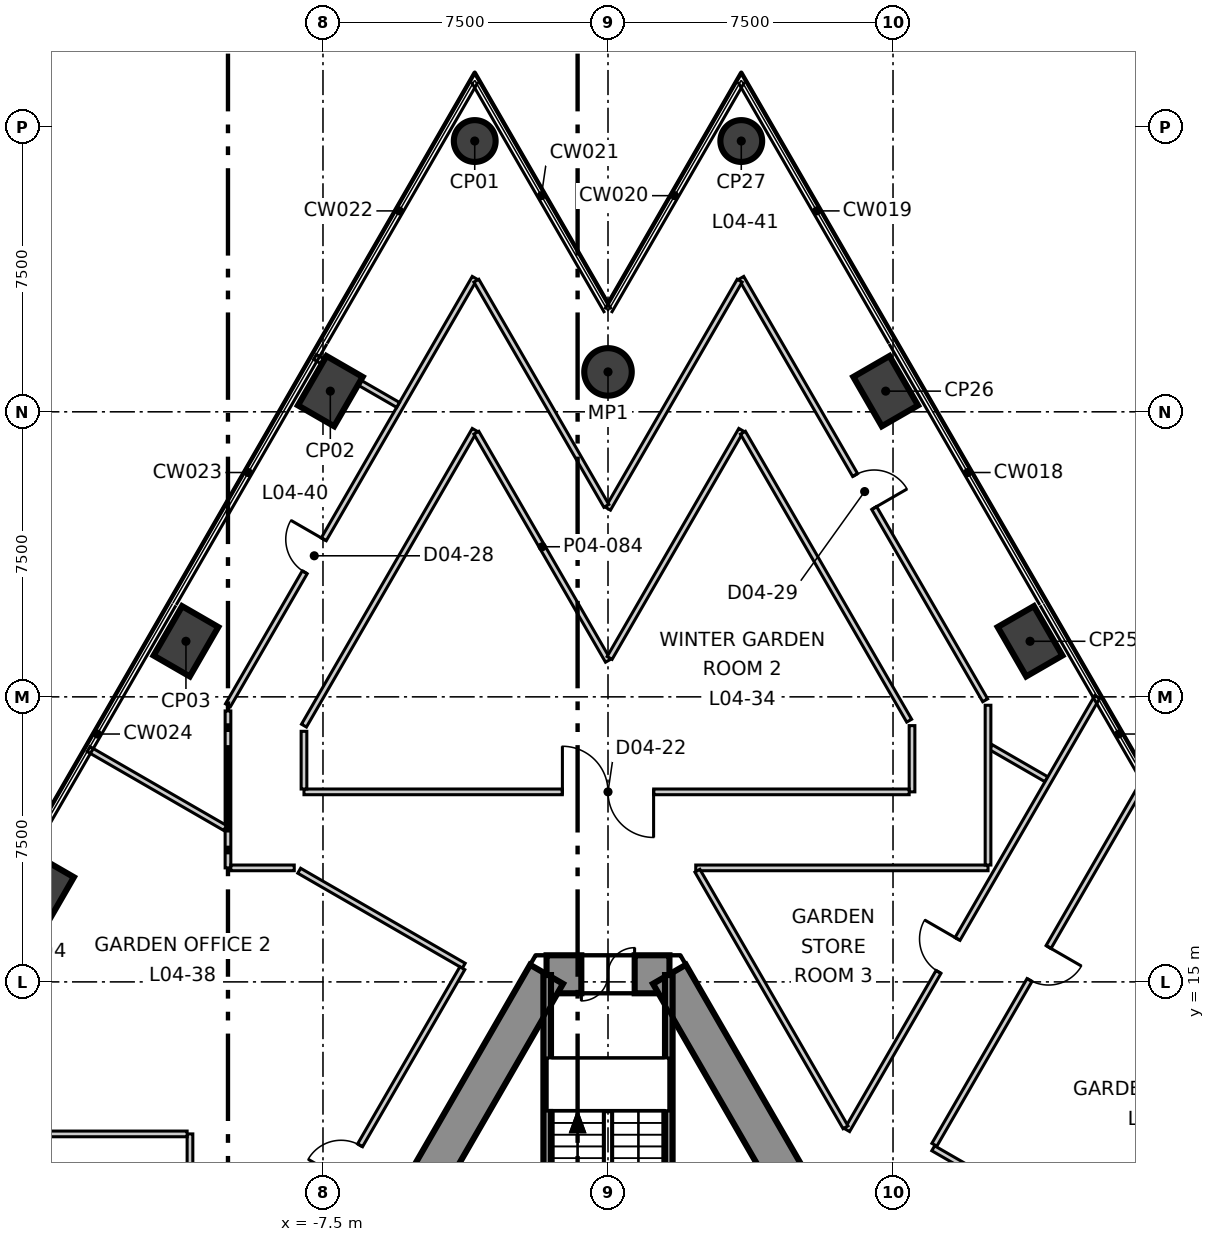
"""IFC4 building model, lengths in metres.
Left out: names, types, materials, properties, quantities, classifications, styles, units other than length and angle.
Written with IfcOpenShell. Run it as: python <this file> out.ifc"""

import sys

from ifc_helpers import new_model, si_unit, direction, frame, frame_2d, origin, origin_2d, place, context, subcontext, project, spatial, polyline, rectangle, circle, outline, extrude, element, fill, save


model = new_model("IFC4")
c1 = context("Model", 3, precision=1e-05, world=origin(), true_north=direction((0.0, 1.0)))
c2 = subcontext(c1, "Body", "Model", "MODEL_VIEW")
j1 = project(units=[si_unit("LENGTHUNIT", "METRE"), si_unit("PLANEANGLEUNIT", "RADIAN")], contexts=[c1])
p1 = place(None, origin())
s1 = spatial("IfcSite", under=j1, at=p1, CompositionType="ELEMENT")
p2 = place(p1, origin())
s2 = spatial("IfcBuilding", under=s1, at=p2, CompositionType="ELEMENT")
p3 = place(p2, frame((0.0, 0.0, 25.3)))
s3 = spatial("IfcBuildingStorey", under=s2, at=p3, CompositionType="ELEMENT", Elevation=25.3)
p4 = place(p3, frame((1.617, 15.2, -0.4), z_axis=(0.0, 0.0, 1.0), x_axis=(-1.0, 0.0, 0.0)))
e1 = element("IfcWall", 1, at=p4, inside=s3, PredefinedType="SHEAR", context=c2, shape_type="SweptSolid", body=[
    extrude(outline(polyline([(-0.288, -0.5), (1.617, -0.5), (3.522, -0.5), (2.945, 0.5), (1.617, 0.5), (0.289, 0.5), (-0.288, -0.5)])), origin(), (0.0, 0.0, 1.0), 5.0),
])
p5 = place(p4, frame((0.917, 0.0, 0.4)))
e2 = element("IfcOpeningElement", 2, at=p5, cuts=e1, PredefinedType="OPENING", context=c2, shape_type="SweptSolid", body=[
    extrude(rectangle(XDim=1.4, YDim=2.1, at=frame_2d((0.7, 1.05))), frame((0.0, 0.51, 0.0), z_axis=(0.0, -1.0, 0.0), x_axis=(1.0, 0.0, 0.0)), (0.0, 0.0, 1.0), 1.02),
])
p6 = place(p3, frame((-1.617, 15.2, -0.4), z_axis=(0.0, 0.0, 1.0), x_axis=(-0.499992141631, -0.866029940768, 0.0)))
e3 = element("IfcWall", 3, at=p6, inside=s3, PredefinedType="SHEAR", context=c2, shape_type="SweptSolid", body=[
    extrude(outline(polyline([(-0.289, -0.499), (1.656, -0.499), (3.601, -0.499), (5.547, -0.499), (7.492, -0.499), (9.437, -0.5), (11.382, -0.5), (13.328, -0.5), (15.273, -0.5), (17.218, -0.5), (19.163, -0.5), (21.109, -0.5), (23.054, -0.5), (24.999, -0.5), (24.422, 0.5), (22.566, 0.5), (20.709, 0.5), (18.853, 0.5), (16.997, 0.5), (15.14, 0.5), (13.284, 0.5), (11.427, 0.5), (9.571, 0.5), (7.715, 0.5), (5.858, 0.5), (4.002, 0.5), (2.146, 0.5), (0.289, 0.5), (-0.289, -0.499)])), origin(), (0.0, 0.0, 1.0), 5.0),
])
p7 = place(p6, frame((11.805, 0.0, 0.4)))
e4 = element("IfcOpeningElement", 4, at=p7, cuts=e3, PredefinedType="OPENING", context=c2, shape_type="SweptSolid", body=[
    extrude(rectangle(XDim=1.1, YDim=2.1, at=frame_2d((0.55, 1.05))), frame((0.0, 0.51, 0.0), z_axis=(0.0, -1.0, 0.0), x_axis=(1.0, 0.0, 0.0)), (0.0, 0.0, 1.0), 1.02),
])
p8 = place(p3, frame((13.972, -6.2, -0.4), z_axis=(0.0, 0.0, 1.0), x_axis=(-0.499992141631, 0.866029940768, 0.0)))
e5 = element("IfcWall", 5, at=p8, inside=s3, PredefinedType="SHEAR", context=c2, shape_type="SweptSolid", body=[
    extrude(outline(polyline([(-0.288, -0.5), (1.657, -0.5), (3.602, -0.5), (5.547, -0.5), (7.493, -0.5), (9.438, -0.5), (11.383, -0.5), (13.328, -0.5), (15.273, -0.5), (17.218, -0.499), (19.164, -0.499), (21.109, -0.499), (23.054, -0.499), (24.999, -0.499), (24.422, 0.5), (22.566, 0.5), (20.709, 0.5), (18.853, 0.5), (16.996, 0.5), (15.14, 0.5), (13.283, 0.5), (11.427, 0.5), (9.57, 0.5), (7.714, 0.5), (5.857, 0.5), (4.001, 0.5), (2.145, 0.5), (0.288, 0.5), (-0.288, -0.5)])), origin(), (0.0, 0.0, 1.0), 5.0),
])
p9 = place(p8, frame((11.455, 0.0, 0.4)))
e6 = element("IfcOpeningElement", 6, at=p9, cuts=e5, PredefinedType="OPENING", context=c2, shape_type="SweptSolid", body=[
    extrude(rectangle(XDim=1.8, YDim=2.1, at=frame_2d((0.9, 1.05))), frame((0.0, 0.51, 0.0), z_axis=(0.0, -1.0, 0.0), x_axis=(1.0, 0.0, 0.0)), (0.0, 0.0, 1.0), 1.02),
])
p10 = place(p3, frame((-3.507, 37.125, -0.4), z_axis=(0.0, 0.0, 1.0), x_axis=(0.5, 0.866025403784, 0.0)))
e7 = element("IfcColumn", 7, at=p10, inside=s3, PredefinedType="COLUMN", context=c2, shape_type="SweptSolid", body=[
    extrude(circle(Radius=0.55, at=origin_2d()), origin(), (0.0, 0.0, 1.0), 5.0),
])
for number, where, z_axis, x_axis in (
    (8, (-7.307, 30.544, -0.4), (0.0, 0.0, 1.0), (0.5, 0.866, 0.0)),
    (9, (-11.106, 23.962, -0.4), (0.0, 0.0, 1.0), (0.5, 0.866, 0.0)),
    (10, (-14.906, 17.381, -0.4), (0.0, 0.0, 1.0), (0.5, 0.866, 0.0)),
    (11, (11.106, 23.962, -0.4), (0.0, 0.0, 1.0), (-0.5, 0.866, 0.0)),
    (12, (7.307, 30.544, -0.4), (0.0, 0.0, 1.0), (-0.5, 0.866, 0.0)),
):
    element("IfcColumn", number, at=place(p3, frame(where, z_axis=z_axis, x_axis=x_axis)), inside=s3, PredefinedType="COLUMN", context=c2, shape_type="SweptSolid", body=[
        extrude(rectangle(XDim=1.5, YDim=1.1, at=origin_2d()), origin(), (0.0, 0.0, 1.0), 5.0),
    ])
p11 = place(p3, frame((3.507, 37.125, -0.4), z_axis=(0.0, 0.0, 1.0), x_axis=(-0.5, 0.866025403784, 0.0)))
e13 = element("IfcColumn", 13, at=p11, inside=s3, PredefinedType="COLUMN", context=c2, shape_type="SweptSolid", body=[
    extrude(circle(Radius=0.55, at=origin_2d()), origin(), (0.0, 0.0, 1.0), 5.0),
])
p12 = place(p3, frame((0.0, 31.05, -0.4), z_axis=(0.0, 0.0, 1.0), x_axis=(1.0, 0.0, 0.0)))
e14 = element("IfcColumn", 14, at=p12, inside=s3, PredefinedType="COLUMN", context=c2, shape_type="SweptSolid", body=[
    extrude(circle(Radius=0.625, at=origin_2d()), origin(), (0.0, 0.0, 1.0), 5.0),
])
p13 = place(p3, frame((-10.0, 22.279, 0.0), z_axis=(0.0, 0.0, 1.0), x_axis=(0.50000725545, 0.866021214808, 0.0)))
e15 = element("IfcWall", 15, at=p13, inside=s3, PredefinedType="PARTITIONING", context=c2, shape_type="SweptSolid", body=[
    extrude(rectangle(XDim=12.986, YDim=0.15, at=frame_2d((6.493, 0.0))), origin(), (0.0, 0.0, 1.0), 4.6),
])
p14 = place(p13, frame((4.041, 0.0, 0.0)))
e16 = element("IfcOpeningElement", 16, at=p14, cuts=e15, PredefinedType="OPENING", context=c2, shape_type="SweptSolid", body=[
    extrude(rectangle(XDim=1.0, YDim=2.1, at=frame_2d((0.5, 1.05))), frame((0.0, 0.085, 0.0), z_axis=(0.0, -1.0, 0.0), x_axis=(1.0, 0.0, 0.0)), (0.0, 0.0, 1.0), 0.17),
])
p15 = place(p3, frame((-10.0, 18.0, 0.0), z_axis=(0.0, 0.0, 1.0), x_axis=(0.0, 1.0, 0.0)))
e17 = element("IfcWall", 17, at=p15, inside=s3, PredefinedType="PARTITIONING", context=c2, shape_type="SweptSolid", body=[
    extrude(rectangle(XDim=4.129, YDim=0.15, at=frame_2d((2.064, 0.0))), origin(), (0.0, 0.0, 1.0), 4.6),
])
p16 = place(p3, frame((-9.925, 18.0, 0.0), z_axis=(0.0, 0.0, 1.0), x_axis=(1.0, 0.0, 0.0)))
e18 = element("IfcWall", 18, at=p16, inside=s3, PredefinedType="PARTITIONING", context=c2, shape_type="SweptSolid", body=[
    extrude(rectangle(XDim=1.669, YDim=0.15, at=frame_2d((0.834, 0.0))), origin(), (0.0, 0.0, 1.0), 4.6),
])
p17 = place(p3, frame((2.309, 18.0, 0.0), z_axis=(0.0, 0.0, 1.0), x_axis=(1.0, 0.0, 0.0)))
e19 = element("IfcWall", 19, at=p17, inside=s3, PredefinedType="PARTITIONING", context=c2, shape_type="SweptSolid", body=[
    extrude(rectangle(XDim=7.691, YDim=0.15, at=frame_2d((3.845, 0.0))), origin(), (0.0, 0.0, 1.0), 4.6),
])
p18 = place(p3, frame((-13.668, 21.125, 0.0), z_axis=(0.0, 0.0, 1.0), x_axis=(0.865970972971, -0.500094265086, 0.0)))
e20 = element("IfcWall", 20, at=p18, inside=s3, PredefinedType="PARTITIONING", context=c2, shape_type="SweptSolid", body=[
    extrude(rectangle(XDim=4.149, YDim=0.15, at=frame_2d((2.075, 0.0))), origin(), (0.0, 0.0, 1.0), 4.6),
])
p19 = place(p3, frame((-8.126, 17.925, 0.0), z_axis=(0.0, 0.0, 1.0), x_axis=(0.866022959057, -0.500004234368, 0.0)))
e21 = element("IfcWall", 21, at=p19, inside=s3, PredefinedType="PARTITIONING", context=c2, shape_type="SweptSolid", body=[
    extrude(rectangle(XDim=5.0, YDim=0.15, at=frame_2d((2.5, 0.0))), origin(), (0.0, 0.0, 1.0), 4.6),
])
p20 = place(p3, frame((-9.716, 5.172, 0.0), z_axis=(0.0, 0.0, 1.0), x_axis=(0.500064951837, 0.865987900576, 0.0)))
e22 = element("IfcWall", 22, at=p20, inside=s3, PredefinedType="PARTITIONING", context=c2, shape_type="SweptSolid", body=[
    extrude(rectangle(XDim=11.765, YDim=0.15, at=frame_2d((5.882, 0.0))), origin(), (0.0, 0.0, 1.0), 4.6),
])
p21 = place(p20, frame((5.382, 0.0, 0.0)))
e23 = element("IfcOpeningElement", 23, at=p21, cuts=e22, PredefinedType="OPENING", context=c2, shape_type="SweptSolid", body=[
    extrude(rectangle(XDim=1.0, YDim=2.1, at=frame_2d((0.5, 1.05))), frame((0.0, 0.085, 0.0), z_axis=(0.0, -1.0, 0.0), x_axis=(1.0, 0.0, 0.0)), (0.0, 0.0, 1.0), 0.17),
])
p22 = place(p3, frame((-11.0, 5.913, 0.0), z_axis=(0.0, 0.0, 1.0), x_axis=(0.0, 1.0, 0.0)))
e24 = element("IfcWall", 24, at=p22, inside=s3, PredefinedType="PARTITIONING", context=c2, shape_type="SweptSolid", body=[
    extrude(rectangle(XDim=5.087, YDim=0.15, at=frame_2d((2.543, 0.0))), origin(), (0.0, 0.0, 1.0), 4.6),
])
p23 = place(p3, frame((-16.426, 11.0, 0.0), z_axis=(0.0, 0.0, 1.0), x_axis=(1.0, 0.0, 0.0)))
e25 = element("IfcWall", 25, at=p23, inside=s3, PredefinedType="PARTITIONING", context=c2, shape_type="SweptSolid", body=[
    extrude(rectangle(XDim=5.351, YDim=0.15, at=frame_2d((2.676, 0.0))), origin(), (0.0, 0.0, 1.0), 4.6),
])
p24 = place(p3, frame((-7.711, 31.444, 0.0), z_axis=(0.0, 0.0, 1.0), x_axis=(0.86593764446, -0.500151972811, 0.0)))
e26 = element("IfcWall", 26, at=p24, inside=s3, PredefinedType="PARTITIONING", context=c2, shape_type="SweptSolid", body=[
    extrude(rectangle(XDim=2.526, YDim=0.15, at=frame_2d((1.263, 0.0))), origin(), (0.0, 0.0, 1.0), 4.6),
])
p25 = place(p3, frame((10.075, 21.175, 0.0), z_axis=(0.0, 0.0, 1.0), x_axis=(0.866072411327, -0.499918571708, 0.0)))
e27 = element("IfcWall", 27, at=p25, inside=s3, PredefinedType="PARTITIONING", context=c2, shape_type="SweptSolid", body=[
    extrude(rectangle(XDim=1.688, YDim=0.15, at=frame_2d((0.844, 0.0))), origin(), (0.0, 0.0, 1.0), 4.6),
])
p26 = place(p3, frame((10.0, 18.075, 0.0), z_axis=(0.0, 0.0, 1.0), x_axis=(0.0, 1.0, 0.0)))
e28 = element("IfcWall", 28, at=p26, inside=s3, PredefinedType="PARTITIONING", context=c2, shape_type="SweptSolid", body=[
    extrude(rectangle(XDim=4.204, YDim=0.15, at=frame_2d((2.102, 0.0))), origin(), (0.0, 0.0, 1.0), 4.6),
])
p27 = place(p3, frame((3.507, 33.525, 0.0), z_axis=(0.0, 0.0, 1.0), x_axis=(0.500009484899, -0.866019927606, 0.0)))
e29 = element("IfcWall", 29, at=p27, inside=s3, PredefinedType="PARTITIONING", context=c2, shape_type="SweptSolid", body=[
    extrude(rectangle(XDim=12.836, YDim=0.15, at=frame_2d((6.418, 0.0))), origin(), (0.0, 0.0, 1.0), 4.6),
])
p28 = place(p27, frame((5.993, 0.0, 0.0)))
e30 = element("IfcOpeningElement", 30, at=p28, cuts=e29, PredefinedType="OPENING", context=c2, shape_type="SweptSolid", body=[
    extrude(rectangle(XDim=1.0, YDim=2.1, at=frame_2d((0.5, 1.05))), frame((0.0, 0.085, 0.0), z_axis=(0.0, -1.0, 0.0), x_axis=(1.0, 0.0, 0.0)), (0.0, 0.0, 1.0), 0.17),
])
p29 = place(p3, frame((0.0, 27.45, 0.0), z_axis=(0.0, 0.0, 1.0), x_axis=(0.500001051461, 0.866024796723, 0.0)))
e31 = element("IfcWall", 31, at=p29, inside=s3, PredefinedType="PARTITIONING", context=c2, shape_type="SweptSolid", body=[
    extrude(rectangle(XDim=6.928, YDim=0.15, at=frame_2d((3.464, 0.0))), origin(), (0.0, 0.0, 1.0), 4.6),
])
p30 = place(p3, frame((-3.464, 33.45, 0.0), z_axis=(0.0, 0.0, 1.0), x_axis=(0.500034424931, -0.866005527629, 0.0)))
e32 = element("IfcWall", 32, at=p30, inside=s3, PredefinedType="PARTITIONING", context=c2, shape_type="SweptSolid", body=[
    extrude(rectangle(XDim=6.842, YDim=0.15, at=frame_2d((3.421, 0.0))), origin(), (0.0, 0.0, 1.0), 4.6),
])
p31 = place(p3, frame((6.293, 11.099, 0.0), z_axis=(0.0, 0.0, 1.0), x_axis=(0.500016782699, 0.866015714072, 0.0)))
e33 = element("IfcWall", 33, at=p31, inside=s3, PredefinedType="PARTITIONING", context=c2, shape_type="SweptSolid", body=[
    extrude(rectangle(XDim=13.164, YDim=0.15, at=frame_2d((6.582, 0.0))), origin(), (0.0, 0.0, 1.0), 4.6),
])
p32 = place(p31, frame((4.809, 0.0, 0.0)))
e34 = element("IfcOpeningElement", 34, at=p32, cuts=e33, PredefinedType="OPENING", context=c2, shape_type="SweptSolid", body=[
    extrude(rectangle(XDim=1.0, YDim=2.1, at=frame_2d((0.5, 1.05))), frame((0.0, 0.085, 0.0), z_axis=(0.0, -1.0, 0.0), x_axis=(1.0, 0.0, 0.0)), (0.0, 0.0, 1.0), 0.17),
])
p33 = place(p3, frame((2.353, 17.925, 0.0), z_axis=(0.0, 0.0, 1.0), x_axis=(0.499932120426, -0.866064590528, 0.0)))
e35 = element("IfcWall", 35, at=p33, inside=s3, PredefinedType="PARTITIONING", context=c2, shape_type="SweptSolid", body=[
    extrude(rectangle(XDim=7.795, YDim=0.15, at=frame_2d((3.897, 0.0))), origin(), (0.0, 0.0, 1.0), 4.6),
])
p34 = place(p3, frame((8.558, 10.622, 0.0), z_axis=(0.0, 0.0, 1.0), x_axis=(0.866055559963, -0.499947764329, 0.0)))
e36 = element("IfcWall", 36, at=p34, inside=s3, PredefinedType="PARTITIONING", context=c2, shape_type="SweptSolid", body=[
    extrude(rectangle(XDim=7.129, YDim=0.15, at=frame_2d((3.564, 0.0))), origin(), (0.0, 0.0, 1.0), 4.6),
])
p35 = place(p3, frame((8.588, 10.714, 0.0), z_axis=(0.0, 0.0, 1.0), x_axis=(0.500047639521, 0.865997897347, 0.0)))
e37 = element("IfcWall", 37, at=p35, inside=s3, PredefinedType="PARTITIONING", context=c2, shape_type="SweptSolid", body=[
    extrude(rectangle(XDim=11.091, YDim=0.15, at=frame_2d((5.546, 0.0))), origin(), (0.0, 0.0, 1.0), 4.05),
])
p36 = place(p35, frame((5.008, 0.0, 0.0)))
e38 = element("IfcOpeningElement", 38, at=p36, cuts=e37, PredefinedType="OPENING", context=c2, shape_type="SweptSolid", body=[
    extrude(rectangle(XDim=1.0, YDim=2.1, at=frame_2d((0.5, 1.05))), frame((0.0, 0.085, 0.0), z_axis=(0.0, -1.0, 0.0), x_axis=(1.0, 0.0, 0.0)), (0.0, 0.0, 1.0), 0.17),
])
p37 = place(p3, frame((-8.0, 21.743, 0.0), z_axis=(0.0, 0.0, 1.0), x_axis=(0.499999188372, 0.866025872377, 0.0)))
e39 = element("IfcWall", 39, at=p37, inside=s3, PredefinedType="PARTITIONING", context=c2, shape_type="SweptSolid", body=[
    extrude(rectangle(XDim=8.986, YDim=0.15, at=frame_2d((4.493, 0.0))), origin(), (0.0, 0.0, 1.0), 4.6),
])
p38 = place(p3, frame((8.0, 20.0, 0.0), z_axis=(0.0, 0.0, 1.0), x_axis=(0.0, 1.0, 0.0)))
e40 = element("IfcWall", 40, at=p38, inside=s3, PredefinedType="PARTITIONING", context=c2, shape_type="SweptSolid", body=[
    extrude(rectangle(XDim=1.743, YDim=0.15, at=frame_2d((0.872, 0.0))), origin(), (0.0, 0.0, 1.0), 4.6),
])
p39 = place(p3, frame((-8.0, 20.0, 0.0), z_axis=(0.0, 0.0, 1.0), x_axis=(1.0, 0.0, 0.0)))
e41 = element("IfcWall", 41, at=p39, inside=s3, PredefinedType="PARTITIONING", context=c2, shape_type="SweptSolid", body=[
    extrude(rectangle(XDim=15.925, YDim=0.15, at=frame_2d((7.962, 0.0))), origin(), (0.0, 0.0, 1.0), 4.6),
])
p40 = place(p39, frame((6.8, 0.0, 0.0)))
e42 = element("IfcOpeningElement", 42, at=p40, cuts=e41, PredefinedType="OPENING", context=c2, shape_type="SweptSolid", body=[
    extrude(rectangle(XDim=2.4, YDim=2.1, at=frame_2d((1.2, 1.05))), frame((0.0, 0.085, 0.0), z_axis=(0.0, -1.0, 0.0), x_axis=(1.0, 0.0, 0.0)), (0.0, 0.0, 1.0), 0.17),
])
p41 = place(p3, frame((-8.0, 20.075, 0.0), z_axis=(0.0, 0.0, 1.0), x_axis=(0.0, 1.0, 0.0)))
e43 = element("IfcWall", 43, at=p41, inside=s3, PredefinedType="PARTITIONING", context=c2, shape_type="SweptSolid", body=[
    extrude(rectangle(XDim=1.518, YDim=0.15, at=frame_2d((0.759, 0.0))), origin(), (0.0, 0.0, 1.0), 4.6),
])
for number, where, z_axis, x_axis in (
    (44, (-3.464, 29.45, 0.0), (0.0, 0.0, 1.0), (0.5, -0.866, 0.0)),
    (45, (0.043, 23.524, 0.0), (0.0, 0.0, 1.0), (0.5, 0.866, 0.0)),
):
    element("IfcWall", number, at=place(p3, frame(where, z_axis=z_axis, x_axis=x_axis)), inside=s3, PredefinedType="PARTITIONING", context=c2, shape_type="SweptSolid", body=[
        extrude(rectangle(XDim=6.929, YDim=0.15, at=frame_2d((3.464, 0.0))), origin(), (0.0, 0.0, 1.0), 4.6),
    ])
p42 = place(p3, frame((3.551, 29.45, 0.0), z_axis=(0.0, 0.0, 1.0), x_axis=(0.499956767928, -0.866050362394, 0.0)))
e46 = element("IfcWall", 46, at=p42, inside=s3, PredefinedType="PARTITIONING", context=c2, shape_type="SweptSolid", body=[
    extrude(rectangle(XDim=8.749, YDim=0.15, at=frame_2d((4.375, 0.0))), origin(), (0.0, 0.0, 1.0), 4.6),
])
for number, where, z_axis, x_axis in (
    (47, (1.6, 6.615, 0.0), (0.0, 0.0, 1.0), (0.0, 1.0, 0.0)),
    (48, (-1.6, 6.615, 0.0), (0.0, 0.0, 1.0), (0.0, 1.0, 0.0)),
):
    element("IfcWall", number, at=place(p3, frame(where, z_axis=z_axis, x_axis=x_axis)), inside=s3, PredefinedType="SOLIDWALL", context=c2, shape_type="SweptSolid", body=[
        extrude(rectangle(XDim=8.565, YDim=0.2, at=frame_2d((4.282, 0.0))), origin(), (0.0, 0.0, 1.0), 4.6),
    ])
p43 = place(p40, origin())
e49 = element("IfcDoor", 49, at=p43, inside=s3, OperationType="DOUBLE_DOOR_SINGLE_SWING", PredefinedType="DOOR", context=c2, shape_type="SweptSolid", body=[
    extrude(rectangle(XDim=2.4, YDim=2.1, at=frame_2d((1.2, 1.05))), frame((0.0, 0.025, 0.0), z_axis=(0.0, -1.0, 0.0), x_axis=(1.0, 0.0, 0.0)), (0.0, 0.0, 1.0), 0.05),
])
fill(e42, e49)
p44 = place(p21, origin())
e50 = element("IfcDoor", 50, at=p44, inside=s3, OperationType="SINGLE_SWING_RIGHT", PredefinedType="DOOR", context=c2, shape_type="SweptSolid", body=[
    extrude(rectangle(XDim=1.0, YDim=2.1, at=frame_2d((0.5, 1.05))), frame((0.0, 0.025, 0.0), z_axis=(0.0, -1.0, 0.0), x_axis=(1.0, 0.0, 0.0)), (0.0, 0.0, 1.0), 0.05),
])
fill(e23, e50)
p45 = place(p32, origin())
e51 = element("IfcDoor", 51, at=p45, inside=s3, OperationType="SINGLE_SWING_LEFT", PredefinedType="DOOR", context=c2, shape_type="SweptSolid", body=[
    extrude(rectangle(XDim=1.0, YDim=2.1, at=frame_2d((0.5, 1.05))), frame((0.0, 0.025, 0.0), z_axis=(0.0, -1.0, 0.0), x_axis=(1.0, 0.0, 0.0)), (0.0, 0.0, 1.0), 0.05),
])
fill(e34, e51)
p46 = place(p14, origin())
e52 = element("IfcDoor", 52, at=p46, inside=s3, OperationType="SINGLE_SWING_LEFT", PredefinedType="DOOR", context=c2, shape_type="SweptSolid", body=[
    extrude(rectangle(XDim=1.0, YDim=2.1, at=frame_2d((0.5, 1.05))), frame((0.0, 0.025, 0.0), z_axis=(0.0, -1.0, 0.0), x_axis=(1.0, 0.0, 0.0)), (0.0, 0.0, 1.0), 0.05),
])
fill(e16, e52)
p47 = place(p28, origin())
e53 = element("IfcDoor", 53, at=p47, inside=s3, OperationType="SINGLE_SWING_LEFT", PredefinedType="DOOR", context=c2, shape_type="SweptSolid", body=[
    extrude(rectangle(XDim=1.0, YDim=2.1, at=frame_2d((0.5, 1.05))), frame((0.0, 0.025, 0.0), z_axis=(0.0, -1.0, 0.0), x_axis=(1.0, 0.0, 0.0)), (0.0, 0.0, 1.0), 0.05),
])
fill(e30, e53)
p48 = place(p36, origin())
e54 = element("IfcDoor", 54, at=p48, inside=s3, OperationType="SINGLE_SWING_RIGHT", PredefinedType="DOOR", context=c2, shape_type="SweptSolid", body=[
    extrude(rectangle(XDim=1.0, YDim=2.1, at=frame_2d((0.5, 1.05))), frame((0.0, 0.025, 0.0), z_axis=(0.0, -1.0, 0.0), x_axis=(1.0, 0.0, 0.0)), (0.0, 0.0, 1.0), 0.05),
])
fill(e38, e54)
p49 = place(p5, origin())
e55 = element("IfcDoor", 55, at=p49, inside=s3, OperationType="DOUBLE_DOOR_SINGLE_SWING", PredefinedType="DOOR", context=c2, shape_type="SweptSolid", body=[
    extrude(rectangle(XDim=1.4, YDim=2.1, at=frame_2d((0.7, 1.05))), frame((0.0, 0.025, 0.0), z_axis=(0.0, -1.0, 0.0), x_axis=(1.0, 0.0, 0.0)), (0.0, 0.0, 1.0), 0.05),
])
fill(e2, e55)
save(model, sys.argv[1])
